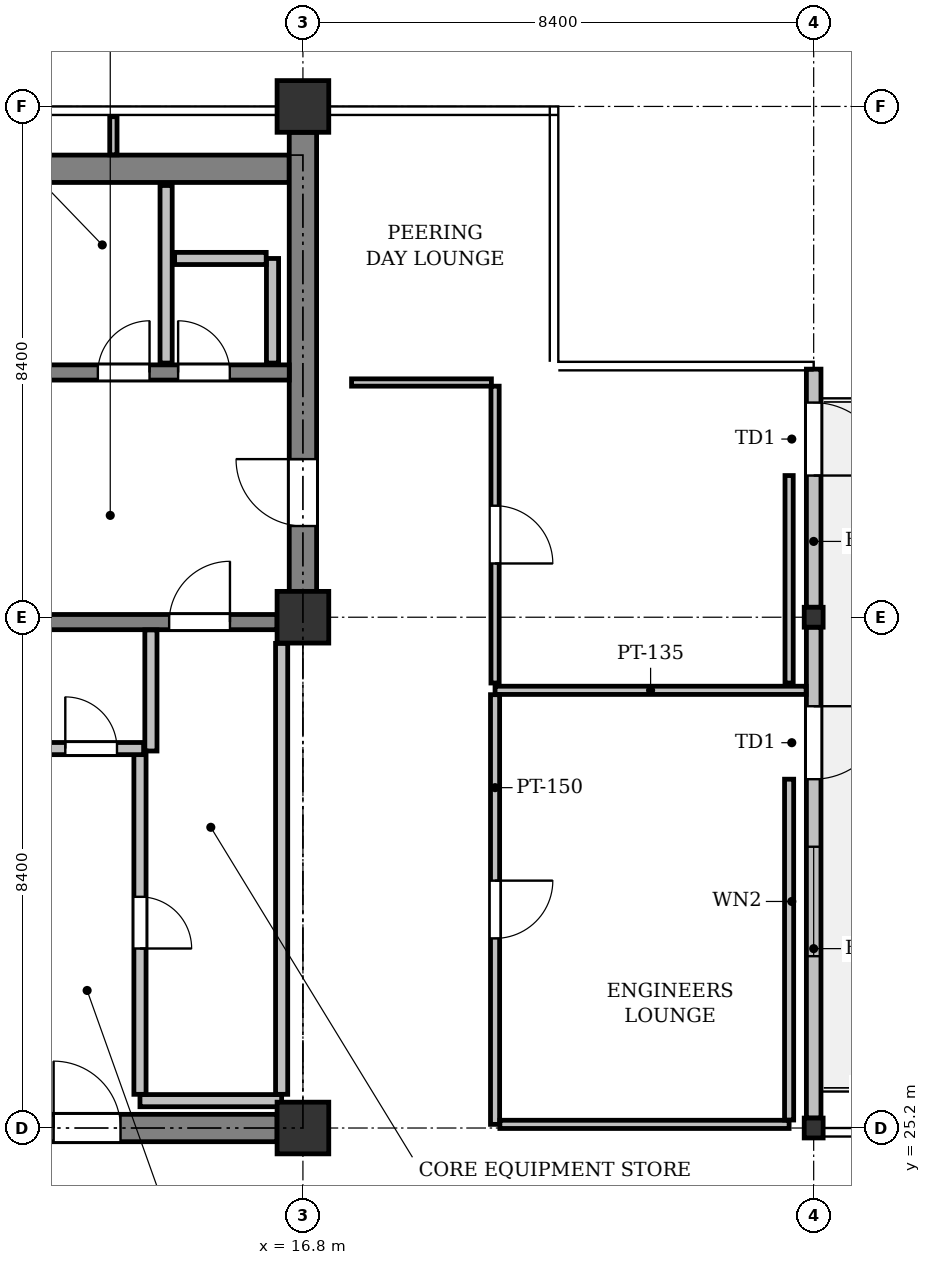
"""IFC4 building model, lengths in metres.
Left out: names, types, materials, properties, quantities, classifications, styles, units other than length and angle.
Written with IfcOpenShell. Run it as: python <this file> out.ifc"""

import sys

from ifc_helpers import new_model, si_unit, direction, frame, frame_2d, origin, origin_2d, place, context, subcontext, project, spatial, rectangle, i_section, extrude, element, fill, save


model = new_model("IFC4")
c1 = context("Model", 3, precision=1e-05, world=origin(), true_north=direction((0.0, 1.0)))
c2 = subcontext(c1, "Body", "Model", "MODEL_VIEW")
j1 = project(units=[si_unit("LENGTHUNIT", "METRE"), si_unit("PLANEANGLEUNIT", "RADIAN")], contexts=[c1])
p1 = place(None, origin())
s1 = spatial("IfcSite", under=j1, at=p1, CompositionType="ELEMENT")
p2 = place(p1, origin())
s2 = spatial("IfcBuilding", under=s1, at=p2, CompositionType="ELEMENT")
p3 = place(p2, frame((0.0, 0.0, 314.2)))
s3 = spatial("IfcBuildingStorey", under=s2, at=p3, CompositionType="ELEMENT", Elevation=314.2)
for number, where, z_axis, x_axis in (
    (1, (16.8, 25.2, 0.0), (0.0, 0.0, 1.0), (1.0, 0.0, 0.0)),
    (2, (16.8, 33.6, 0.0), (0.0, 0.0, 1.0), (1.0, 0.0, 0.0)),
    (3, (16.8, 42.0, 0.0), (0.0, 0.0, 1.0), (1.0, 0.0, 0.0)),
):
    element("IfcColumn", number, at=place(p3, frame(where, z_axis=z_axis, x_axis=x_axis)), inside=s3, PredefinedType="COLUMN", context=c2, shape_type="SweptSolid", body=[
        extrude(rectangle(XDim=0.85, YDim=0.85, at=origin_2d()), origin(), (0.0, 0.0, 1.0), 4.0),
    ])
for number, where, z_axis, x_axis in (
    (4, (25.2, 25.2, 0.0), (0.0, 0.0, 1.0), (1.0, 0.0, 0.0)),
    (5, (25.2, 33.6, 0.0), (0.0, 0.0, 1.0), (1.0, 0.0, 0.0)),
):
    element("IfcColumn", number, at=place(p3, frame(where, z_axis=z_axis, x_axis=x_axis)), inside=s3, PredefinedType="COLUMN", context=c2, shape_type="SweptSolid", body=[
        extrude(i_section(OverallWidth=0.311, OverallDepth=0.327, WebThickness=0.016, FlangeThickness=0.025, FilletRadius=0.017, at=origin_2d()), origin(), (0.0, 0.0, 1.0), 4.0),
    ])
p4 = place(p3, frame((25.2, 37.68, 0.0), z_axis=(0.0, 0.0, 1.0), x_axis=(0.0, -1.0, 0.0)))
e6 = element("IfcWall", 6, at=p4, inside=s3, PredefinedType="STANDARD", context=c2, shape_type="SweptSolid", body=[
    extrude(rectangle(XDim=3.917, YDim=0.24, at=frame_2d((1.958, 0.0))), origin(), (0.0, 0.0, 1.0), 3.725),
])
p5 = place(p4, frame((0.55, 0.0, 0.0)))
e7 = element("IfcOpeningElement", 7, at=p5, cuts=e6, PredefinedType="OPENING", context=c2, shape_type="SweptSolid", body=[
    extrude(rectangle(XDim=1.2, YDim=2.2, at=frame_2d((0.6, 1.1))), frame((0.0, 0.13, 0.0), z_axis=(0.0, -1.0, 0.0), x_axis=(1.0, 0.0, 0.0)), (0.0, 0.0, 1.0), 0.26),
])
p6 = place(p3, frame((25.2, 33.437, 0.0), z_axis=(0.0, 0.0, 1.0), x_axis=(0.0, -1.0, 0.0)))
e8 = element("IfcWall", 8, at=p6, inside=s3, PredefinedType="STANDARD", context=c2, shape_type="SweptSolid", body=[
    extrude(rectangle(XDim=8.073, YDim=0.24, at=frame_2d((4.037, 0.0))), origin(), (0.0, 0.0, 1.0), 3.475),
])
p7 = place(p6, frame((0.3, 0.0, 0.0)))
e9 = element("IfcOpeningElement", 9, at=p7, cuts=e8, PredefinedType="OPENING", context=c2, shape_type="SweptSolid", body=[
    extrude(rectangle(XDim=1.2, YDim=2.2, at=frame_2d((0.6, 1.1))), frame((0.0, 0.13, 0.0), z_axis=(0.0, -1.0, 0.0), x_axis=(1.0, 0.0, 0.0)), (0.0, 0.0, 1.0), 0.26),
])
p8 = place(p6, frame((3.287, 0.0, 0.9)))
e10 = element("IfcOpeningElement", 10, at=p8, cuts=e8, PredefinedType="OPENING", context=c2, shape_type="SweptSolid", body=[
    extrude(rectangle(XDim=1.5, YDim=1.6, at=frame_2d((0.75, 0.8))), frame((0.0, 0.13, 0.0), z_axis=(0.0, -1.0, 0.0), x_axis=(1.0, 0.0, 0.0)), (0.0, 0.0, 1.0), 0.26),
])
p9 = place(p3, frame((8.625, 40.975, 0.0), z_axis=(0.0, 0.0, 1.0), x_axis=(1.0, 0.0, 0.0)))
e11 = element("IfcWall", 11, at=p9, inside=s3, PredefinedType="SHEAR", context=c2, shape_type="SweptSolid", body=[
    extrude(rectangle(XDim=7.95, YDim=0.45, at=frame_2d((3.975, 0.0))), origin(), (0.0, 0.0, 1.0), 3.725),
])
p10 = place(p3, frame((16.8, 34.025, 0.0), z_axis=(0.0, 0.0, 1.0), x_axis=(0.0, 1.0, 0.0)))
e12 = element("IfcWall", 12, at=p10, inside=s3, PredefinedType="SHEAR", context=c2, shape_type="SweptSolid", body=[
    extrude(rectangle(XDim=7.55, YDim=0.45, at=frame_2d((3.775, 0.0))), origin(), (0.0, 0.0, 1.0), 3.725),
])
p11 = place(p10, frame((1.075, 0.0, 0.0)))
e13 = element("IfcOpeningElement", 13, at=p11, cuts=e12, PredefinedType="OPENING", context=c2, shape_type="SweptSolid", body=[
    extrude(rectangle(XDim=1.1, YDim=2.15, at=frame_2d((0.55, 1.075))), frame((0.0, 0.235, 0.0), z_axis=(0.0, -1.0, 0.0), x_axis=(1.0, 0.0, 0.0)), (0.0, 0.0, 1.0), 0.47),
])
p12 = place(p3, frame((8.825, 25.2, 0.0), z_axis=(0.0, 0.0, 1.0), x_axis=(1.0, 0.0, 0.0)))
e14 = element("IfcWall", 14, at=p12, inside=s3, PredefinedType="SHEAR", context=c2, shape_type="SweptSolid", body=[
    extrude(rectangle(XDim=7.55, YDim=0.45, at=frame_2d((3.775, 0.0))), origin(), (0.0, 0.0, 1.0), 3.725),
])
p13 = place(p12, frame((3.875, 0.0, 0.0)))
e15 = element("IfcOpeningElement", 15, at=p13, cuts=e14, PredefinedType="OPENING", context=c2, shape_type="SweptSolid", body=[
    extrude(rectangle(XDim=1.1, YDim=2.15, at=frame_2d((0.55, 1.075))), frame((0.0, 0.235, 0.0), z_axis=(0.0, -1.0, 0.0), x_axis=(1.0, 0.0, 0.0)), (0.0, 0.0, 1.0), 0.47),
])
p14 = place(p3, frame((12.45, 33.52, 0.0), z_axis=(0.0, 0.0, 1.0), x_axis=(1.0, 0.0, 0.0)))
e16 = element("IfcWall", 16, at=p14, inside=s3, PredefinedType="SHEAR", context=c2, shape_type="SweptSolid", body=[
    extrude(rectangle(XDim=3.925, YDim=0.25, at=frame_2d((1.962, 0.0))), origin(), (0.0, 0.0, 1.0), 3.725),
])
p15 = place(p14, frame((2.15, 0.0, 0.0)))
e17 = element("IfcOpeningElement", 17, at=p15, cuts=e16, PredefinedType="OPENING", context=c2, shape_type="SweptSolid", body=[
    extrude(rectangle(XDim=1.0, YDim=2.15, at=frame_2d((0.5, 1.075))), frame((0.0, 0.135, 0.0), z_axis=(0.0, -1.0, 0.0), x_axis=(1.0, 0.0, 0.0)), (0.0, 0.0, 1.0), 0.27),
])
p16 = place(p3, frame((12.45, 37.625, 0.0), z_axis=(0.0, 0.0, 1.0), x_axis=(1.0, 0.0, 0.0)))
e18 = element("IfcWall", 18, at=p16, inside=s3, PredefinedType="SHEAR", context=c2, shape_type="SweptSolid", body=[
    extrude(rectangle(XDim=4.125, YDim=0.25, at=frame_2d((2.062, 0.0))), origin(), (0.0, 0.0, 1.0), 3.725),
])
p17 = place(p16, frame((0.978, 0.0, 0.0)))
e19 = element("IfcOpeningElement", 19, at=p17, cuts=e18, PredefinedType="OPENING", context=c2, shape_type="SweptSolid", body=[
    extrude(rectangle(XDim=0.85, YDim=2.15, at=frame_2d((0.425, 1.075))), frame((0.0, 0.135, 0.0), z_axis=(0.0, -1.0, 0.0), x_axis=(1.0, 0.0, 0.0)), (0.0, 0.0, 1.0), 0.27),
])
p18 = place(p16, frame((2.298, 0.0, 0.0)))
e20 = element("IfcOpeningElement", 20, at=p18, cuts=e18, PredefinedType="OPENING", context=c2, shape_type="SweptSolid", body=[
    extrude(rectangle(XDim=0.85, YDim=2.15, at=frame_2d((0.425, 1.075))), frame((0.0, 0.135, 0.0), z_axis=(0.0, -1.0, 0.0), x_axis=(1.0, 0.0, 0.0)), (0.0, 0.0, 1.0), 0.27),
])
p19 = place(p3, frame((14.12, 25.65, 0.0), z_axis=(0.0, 0.0, 1.0), x_axis=(1.0, 0.0, 0.0)))
e21 = element("IfcWall", 21, at=p19, inside=s3, PredefinedType="PARTITIONING", context=c2, shape_type="SweptSolid", body=[
    extrude(rectangle(XDim=2.33, YDim=0.2, at=frame_2d((1.165, 0.0))), origin(), (0.0, 0.0, 1.0), 3.725),
])
p20 = place(p3, frame((16.45, 25.754, 0.0), z_axis=(0.0, 0.0, 1.0), x_axis=(0.0, 1.0, 0.0)))
e22 = element("IfcWall", 22, at=p20, inside=s3, PredefinedType="PARTITIONING", context=c2, shape_type="SweptSolid", body=[
    extrude(rectangle(XDim=7.416, YDim=0.2, at=frame_2d((3.708, 0.0))), origin(), (0.0, 0.0, 1.0), 3.725),
])
p21 = place(p3, frame((14.3, 33.391, 0.0), z_axis=(0.0, 0.0, 1.0), x_axis=(0.0, -1.0, 0.0)))
e23 = element("IfcWall", 23, at=p21, inside=s3, PredefinedType="PARTITIONING", context=c2, shape_type="SweptSolid", body=[
    extrude(rectangle(XDim=1.991, YDim=0.2, at=frame_2d((0.996, 0.0))), origin(), (0.0, 0.0, 1.0), 3.725),
])
p22 = place(p3, frame((14.12, 31.4, 0.0), z_axis=(0.0, 0.0, 1.0), x_axis=(0.0, -1.0, 0.0)))
e24 = element("IfcWall", 24, at=p22, inside=s3, PredefinedType="PARTITIONING", context=c2, shape_type="SweptSolid", body=[
    extrude(rectangle(XDim=5.646, YDim=0.2, at=frame_2d((2.823, 0.0))), origin(), (0.0, 0.0, 1.0), 3.725),
])
p23 = place(p22, frame((2.398, 0.0, 0.0)))
e25 = element("IfcOpeningElement", 25, at=p23, cuts=e24, PredefinedType="OPENING", context=c2, shape_type="SweptSolid", body=[
    extrude(rectangle(XDim=0.85, YDim=2.15, at=frame_2d((0.425, 1.075))), frame((0.0, 0.11, 0.0), z_axis=(0.0, -1.0, 0.0), x_axis=(1.0, 0.0, 0.0)), (0.0, 0.0, 1.0), 0.22),
])
p24 = place(p3, frame((12.454, 31.44, 0.0), z_axis=(0.0, 0.0, 1.0), x_axis=(1.0, 0.0, 0.0)))
e26 = element("IfcWall", 26, at=p24, inside=s3, PredefinedType="PARTITIONING", context=c2, shape_type="SweptSolid", body=[
    extrude(rectangle(XDim=1.726, YDim=0.2, at=frame_2d((0.863, 0.0))), origin(), (0.0, 0.0, 1.0), 3.725),
])
p25 = place(p24, frame((0.438, 0.0, 0.0)))
e27 = element("IfcOpeningElement", 27, at=p25, cuts=e26, PredefinedType="OPENING", context=c2, shape_type="SweptSolid", body=[
    extrude(rectangle(XDim=0.85, YDim=2.15, at=frame_2d((0.425, 1.075))), frame((0.0, 0.11, 0.0), z_axis=(0.0, -1.0, 0.0), x_axis=(1.0, 0.0, 0.0)), (0.0, 0.0, 1.0), 0.22),
])
p26 = place(p3, frame((14.55, 37.78, 0.0), z_axis=(0.0, 0.0, 1.0), x_axis=(0.0, 1.0, 0.0)))
e28 = element("IfcWall", 28, at=p26, inside=s3, PredefinedType="PARTITIONING", context=c2, shape_type="SweptSolid", body=[
    extrude(rectangle(XDim=2.92, YDim=0.2, at=frame_2d((1.46, 0.0))), origin(), (0.0, 0.0, 1.0), 2.775),
])
p27 = place(p3, frame((16.3, 37.78, 0.0), z_axis=(0.0, 0.0, 1.0), x_axis=(0.0, 1.0, 0.0)))
e29 = element("IfcWall", 29, at=p27, inside=s3, PredefinedType="PARTITIONING", context=c2, shape_type="SweptSolid", body=[
    extrude(rectangle(XDim=1.72, YDim=0.2, at=frame_2d((0.86, 0.0))), origin(), (0.0, 0.0, 1.0), 2.775),
])
p28 = place(p3, frame((16.196, 39.5, 0.0), z_axis=(0.0, 0.0, 1.0), x_axis=(-1.0, 0.0, 0.0)))
e30 = element("IfcWall", 30, at=p28, inside=s3, PredefinedType="PARTITIONING", context=c2, shape_type="SweptSolid", body=[
    extrude(rectangle(XDim=1.506, YDim=0.2, at=frame_2d((0.753, 0.0))), origin(), (0.0, 0.0, 1.0), 2.775),
])
p29 = place(p3, frame((19.96, 37.4, 0.0), z_axis=(0.0, 0.0, 1.0), x_axis=(0.0, -1.0, 0.0)))
e31 = element("IfcWall", 31, at=p29, inside=s3, PredefinedType="PARTITIONING", context=c2, shape_type="SweptSolid", body=[
    extrude(rectangle(XDim=12.14, YDim=0.15, at=frame_2d((6.07, 0.0))), origin(), (0.0, 0.0, 1.0), 3.271),
])
p30 = place(p29, frame((5.595, 0.0, 0.0)))
e32 = element("IfcOpeningElement", 32, at=p30, cuts=e31, PredefinedType="OPENING", context=c2, shape_type="SweptSolid", body=[
    extrude(rectangle(XDim=0.95, YDim=2.15, at=frame_2d((0.475, 1.075))), frame((0.0, 0.085, 0.0), z_axis=(0.0, -1.0, 0.0), x_axis=(1.0, 0.0, 0.0)), (0.0, 0.0, 1.0), 0.17),
])
p31 = place(p3, frame((20.039, 25.26, 0.0), z_axis=(0.0, 0.0, 1.0), x_axis=(1.0, 0.0, 0.0)))
e33 = element("IfcWall", 33, at=p31, inside=s3, PredefinedType="PARTITIONING", context=c2, shape_type="SweptSolid", body=[
    extrude(rectangle(XDim=4.777, YDim=0.135, at=frame_2d((2.388, 0.0))), origin(), (0.0, 0.0, 1.0), 3.271),
])
p32 = place(p3, frame((24.816, 25.332, 0.0), z_axis=(0.0, 0.0, 1.0), x_axis=(0.0, 1.0, 0.0)))
e34 = element("IfcWall", 34, at=p32, inside=s3, PredefinedType="PARTITIONING", context=c2, shape_type="SweptSolid", body=[
    extrude(rectangle(XDim=6.605, YDim=0.15, at=frame_2d((3.302, 0.0))), origin(), (0.0, 0.0, 1.0), 3.725),
])
p33 = place(p3, frame((13.683, 41.831, 0.0), z_axis=(0.0, 0.0, 1.0), x_axis=(0.0, -1.0, 0.0)))
e35 = element("IfcWall", 35, at=p33, inside=s3, PredefinedType="PARTITIONING", context=c2, shape_type="SweptSolid", body=[
    extrude(rectangle(XDim=0.627, YDim=0.12, at=frame_2d((0.313, 0.0))), origin(), (0.0, 0.0, 1.0), 3.725),
])
p34 = place(p3, frame((17.6, 37.46, 0.0), z_axis=(0.0, 0.0, 1.0), x_axis=(1.0, 0.0, 0.0)))
e36 = element("IfcWall", 36, at=p34, inside=s3, PredefinedType="PARTITIONING", context=c2, shape_type="SweptSolid", body=[
    extrude(rectangle(XDim=2.3, YDim=0.12, at=frame_2d((1.15, 0.0))), origin(), (0.0, 0.0, 1.0), 3.725),
])
p35 = place(p5, origin())
e37 = element("IfcDoor", 37, at=p35, inside=s3, OperationType="SINGLE_SWING_RIGHT", PredefinedType="DOOR", context=c2, shape_type="SweptSolid", body=[
    extrude(rectangle(XDim=1.2, YDim=2.2, at=frame_2d((0.6, 1.1))), frame((0.0, 0.025, 0.0), z_axis=(0.0, -1.0, 0.0), x_axis=(1.0, 0.0, 0.0)), (0.0, 0.0, 1.0), 0.05),
])
fill(e7, e37)
p36 = place(p7, origin())
e38 = element("IfcDoor", 38, at=p36, inside=s3, OperationType="SINGLE_SWING_LEFT", PredefinedType="DOOR", context=c2, shape_type="SweptSolid", body=[
    extrude(rectangle(XDim=1.2, YDim=2.2, at=frame_2d((0.6, 1.1))), frame((0.0, 0.025, 0.0), z_axis=(0.0, -1.0, 0.0), x_axis=(1.0, 0.0, 0.0)), (0.0, 0.0, 1.0), 0.05),
])
fill(e9, e38)
p37 = place(p8, origin())
e39 = element("IfcWindow", 39, at=p37, inside=s3, PartitioningType="SINGLE_PANEL", PredefinedType="WINDOW", context=c2, shape_type="SweptSolid", body=[
    extrude(rectangle(XDim=1.5, YDim=1.6, at=frame_2d((0.75, 0.8))), frame((0.0, 0.03, 0.0), z_axis=(0.0, -1.0, 0.0), x_axis=(1.0, 0.0, 0.0)), (0.0, 0.0, 1.0), 0.06),
])
fill(e10, e39)
p38 = place(p11, origin())
e40 = element("IfcDoor", 40, at=p38, inside=s3, OperationType="SINGLE_SWING_LEFT", PredefinedType="DOOR", context=c2, shape_type="SweptSolid", body=[
    extrude(rectangle(XDim=1.1, YDim=2.15, at=frame_2d((0.55, 1.075))), frame((0.0, 0.025, 0.0), z_axis=(0.0, -1.0, 0.0), x_axis=(1.0, 0.0, 0.0)), (0.0, 0.0, 1.0), 0.05),
])
fill(e13, e40)
p39 = place(p13, origin())
e41 = element("IfcDoor", 41, at=p39, inside=s3, OperationType="SINGLE_SWING_RIGHT", PredefinedType="DOOR", context=c2, shape_type="SweptSolid", body=[
    extrude(rectangle(XDim=1.1, YDim=2.15, at=frame_2d((0.55, 1.075))), frame((0.0, 0.025, 0.0), z_axis=(0.0, -1.0, 0.0), x_axis=(1.0, 0.0, 0.0)), (0.0, 0.0, 1.0), 0.05),
])
fill(e15, e41)
p40 = place(p15, origin())
e42 = element("IfcDoor", 42, at=p40, inside=s3, OperationType="SINGLE_SWING_RIGHT", PredefinedType="DOOR", context=c2, shape_type="SweptSolid", body=[
    extrude(rectangle(XDim=1.0, YDim=2.15, at=frame_2d((0.5, 1.075))), frame((0.0, 0.025, 0.0), z_axis=(0.0, -1.0, 0.0), x_axis=(1.0, 0.0, 0.0)), (0.0, 0.0, 1.0), 0.05),
])
fill(e17, e42)
p41 = place(p23, origin())
e43 = element("IfcDoor", 43, at=p41, inside=s3, OperationType="SINGLE_SWING_RIGHT", PredefinedType="DOOR", context=c2, shape_type="SweptSolid", body=[
    extrude(rectangle(XDim=0.85, YDim=2.15, at=frame_2d((0.425, 1.075))), frame((0.0, 0.025, 0.0), z_axis=(0.0, -1.0, 0.0), x_axis=(1.0, 0.0, 0.0)), (0.0, 0.0, 1.0), 0.05),
])
fill(e25, e43)
p42 = place(p25, origin())
e44 = element("IfcDoor", 44, at=p42, inside=s3, OperationType="SINGLE_SWING_LEFT", PredefinedType="DOOR", context=c2, shape_type="SweptSolid", body=[
    extrude(rectangle(XDim=0.85, YDim=2.15, at=frame_2d((0.425, 1.075))), frame((0.0, 0.025, 0.0), z_axis=(0.0, -1.0, 0.0), x_axis=(1.0, 0.0, 0.0)), (0.0, 0.0, 1.0), 0.05),
])
fill(e27, e44)
p43 = place(p17, origin())
e45 = element("IfcDoor", 45, at=p43, inside=s3, OperationType="SINGLE_SWING_RIGHT", PredefinedType="DOOR", context=c2, shape_type="SweptSolid", body=[
    extrude(rectangle(XDim=0.85, YDim=2.15, at=frame_2d((0.425, 1.075))), frame((0.0, 0.025, 0.0), z_axis=(0.0, -1.0, 0.0), x_axis=(1.0, 0.0, 0.0)), (0.0, 0.0, 1.0), 0.05),
])
fill(e19, e45)
p44 = place(p18, origin())
e46 = element("IfcDoor", 46, at=p44, inside=s3, OperationType="SINGLE_SWING_LEFT", PredefinedType="DOOR", context=c2, shape_type="SweptSolid", body=[
    extrude(rectangle(XDim=0.85, YDim=2.15, at=frame_2d((0.425, 1.075))), frame((0.0, 0.025, 0.0), z_axis=(0.0, -1.0, 0.0), x_axis=(1.0, 0.0, 0.0)), (0.0, 0.0, 1.0), 0.05),
])
fill(e20, e46)
p45 = place(p30, origin())
e47 = element("IfcDoor", 47, at=p45, inside=s3, OperationType="SINGLE_SWING_RIGHT", PredefinedType="DOOR", context=c2, shape_type="SweptSolid", body=[
    extrude(rectangle(XDim=0.95, YDim=2.15, at=frame_2d((0.475, 1.075))), frame((0.0, 0.025, 0.0), z_axis=(0.0, -1.0, 0.0), x_axis=(1.0, 0.0, 0.0)), (0.0, 0.0, 1.0), 0.05),
])
fill(e32, e47)
save(model, sys.argv[1])
